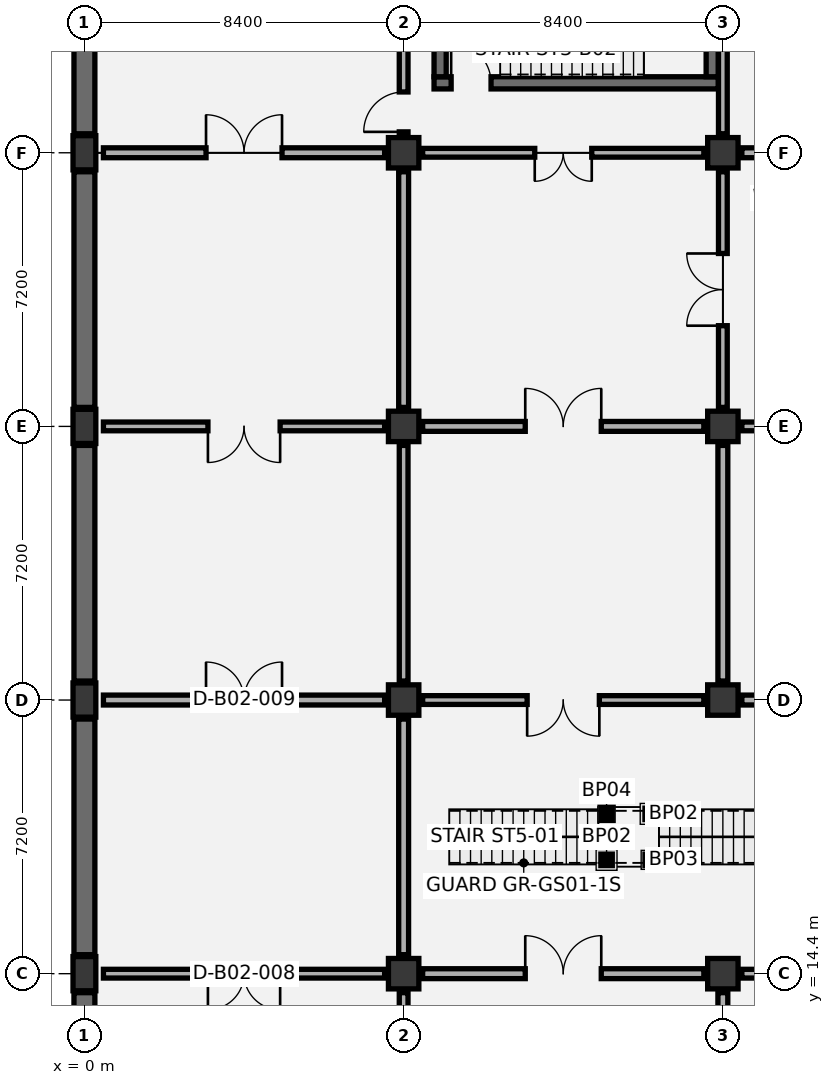
"""IFC4 building model, lengths in metres.
Left out: names, types, materials, properties, quantities, classifications, styles, units other than length and angle.
Written with IfcOpenShell. Run it as: python <this file> out.ifc"""

import sys

from ifc_helpers import new_model, si_unit, direction, frame, frame_2d, origin, origin_2d, place, context, subcontext, project, spatial, rectangle, i_section, extrude, element, fill, save


model = new_model("IFC4")
c1 = context("Model", 3, precision=1e-05, world=origin(), true_north=direction((0.0, 1.0)))
c2 = subcontext(c1, "Body", "Model", "MODEL_VIEW")
j1 = project(units=[si_unit("LENGTHUNIT", "METRE"), si_unit("PLANEANGLEUNIT", "RADIAN")], contexts=[c1])
p1 = place(None, origin())
s1 = spatial("IfcSite", under=j1, at=p1, CompositionType="ELEMENT")
p2 = place(p1, origin())
s2 = spatial("IfcBuilding", under=s1, at=p2, CompositionType="ELEMENT")
p3 = place(p2, frame((0.0, 0.0, -9.6)))
s3 = spatial("IfcBuildingStorey", under=s2, at=p3, CompositionType="ELEMENT", Elevation=-9.6)
for number, where, z_axis, x_axis in (
    (1, (0.0, 14.4, 0.0), (0.0, 0.0, 1.0), (1.0, 0.0, 0.0)),
    (2, (0.0, 21.6, 0.0), (0.0, 0.0, 1.0), (1.0, 0.0, 0.0)),
    (3, (0.0, 28.8, 0.0), (0.0, 0.0, 1.0), (1.0, 0.0, 0.0)),
    (4, (0.0, 36.0, 0.0), (0.0, 0.0, 1.0), (1.0, 0.0, 0.0)),
):
    element("IfcColumn", number, at=place(p3, frame(where, z_axis=z_axis, x_axis=x_axis)), inside=s3, PredefinedType="COLUMN", context=c2, shape_type="SweptSolid", body=[
        extrude(rectangle(XDim=0.6, YDim=0.9, at=origin_2d()), origin(), (0.0, 0.0, 1.0), 4.8),
    ])
for number, where, z_axis, x_axis in (
    (5, (8.4, 14.4, 0.0), (0.0, 0.0, 1.0), (1.0, 0.0, 0.0)),
    (6, (8.4, 21.6, 0.0), (0.0, 0.0, 1.0), (1.0, 0.0, 0.0)),
    (7, (8.4, 28.8, 0.0), (0.0, 0.0, 1.0), (1.0, 0.0, 0.0)),
    (8, (8.4, 36.0, 0.0), (0.0, 0.0, 1.0), (1.0, 0.0, 0.0)),
    (9, (16.8, 14.4, 0.0), (0.0, 0.0, 1.0), (1.0, 0.0, 0.0)),
    (10, (16.8, 21.6, 0.0), (0.0, 0.0, 1.0), (1.0, 0.0, 0.0)),
    (11, (16.8, 28.8, 0.0), (0.0, 0.0, 1.0), (1.0, 0.0, 0.0)),
    (12, (16.8, 36.0, 0.0), (0.0, 0.0, 1.0), (1.0, 0.0, 0.0)),
):
    element("IfcColumn", number, at=place(p3, frame(where, z_axis=z_axis, x_axis=x_axis)), inside=s3, PredefinedType="COLUMN", context=c2, shape_type="SweptSolid", body=[
        extrude(rectangle(XDim=0.8, YDim=0.8, at=origin_2d()), origin(), (0.0, 0.0, 1.0), 4.8),
    ])
for number, where, z_axis, x_axis in (
    (13, (13.74, 17.395, 0.0), (0.0, 0.0, 1.0), (1.0, 0.0, 0.0)),
    (14, (14.9, 17.395, 0.0), (0.0, 0.0, 1.0), (1.0, 0.0, 0.0)),
    (15, (13.74, 18.605, 0.0), (0.0, 0.0, 1.0), (1.0, 0.0, 0.0)),
    (16, (14.9, 18.605, 0.0), (0.0, 0.0, 1.0), (1.0, 0.0, 0.0)),
):
    element("IfcColumn", number, at=place(p3, frame(where, z_axis=z_axis, x_axis=x_axis)), inside=s3, PredefinedType="COLUMN", context=c2, shape_type="SweptSolid", body=[
        extrude(i_section(OverallWidth=0.3, OverallDepth=0.3, WebThickness=0.011, FlangeThickness=0.019, FilletRadius=0.027, at=origin_2d()), origin(), (0.0, 0.0, 1.0), 2.22),
    ])
p4 = place(p3, frame((0.0, 7.7, 0.0), z_axis=(0.0, 0.0, 1.0), x_axis=(0.0, 1.0, 0.0)))
e17 = element("IfcWall", 17, at=p4, inside=s3, PredefinedType="USERDEFINED", context=c2, shape_type="SweptSolid", body=[
    extrude(rectangle(XDim=6.2, YDim=0.55, at=frame_2d((3.1, 0.0))), origin(), (0.0, 0.0, 1.0), 4.4),
])
p5 = place(p3, frame((0.0, 14.9, 0.0), z_axis=(0.0, 0.0, 1.0), x_axis=(0.0, 1.0, 0.0)))
e18 = element("IfcWall", 18, at=p5, inside=s3, PredefinedType="USERDEFINED", context=c2, shape_type="SweptSolid", body=[
    extrude(rectangle(XDim=6.2, YDim=0.55, at=frame_2d((3.1, 0.0))), origin(), (0.0, 0.0, 1.0), 4.4),
])
for number, where, z_axis, x_axis in (
    (19, (0.0, 22.1, 0.0), (0.0, 0.0, 1.0), (0.0, 1.0, 0.0)),
    (20, (0.0, 29.3, 0.0), (0.0, 0.0, 1.0), (0.0, 1.0, 0.0)),
    (21, (0.0, 36.5, 0.0), (0.0, 0.0, 1.0), (0.0, 1.0, 0.0)),
):
    element("IfcWall", number, at=place(p3, frame(where, z_axis=z_axis, x_axis=x_axis)), inside=s3, PredefinedType="USERDEFINED", context=c2, shape_type="SweptSolid", body=[
        extrude(rectangle(XDim=6.2, YDim=0.55, at=frame_2d((3.1, 0.0))), origin(), (0.0, 0.0, 1.0), 4.4),
    ])
p6 = place(p3, frame((9.2, 37.84, 0.0), z_axis=(0.0, 0.0, 1.0), x_axis=(1.0, 0.0, 0.0)))
e22 = element("IfcWall", 22, at=p6, inside=s3, PredefinedType="SHEAR", context=c2, shape_type="SweptSolid", body=[
    extrude(rectangle(XDim=7.48, YDim=0.32, at=frame_2d((3.74, 0.0))), origin(), (0.0, 0.0, 1.0), 4.4),
])
p7 = place(p6, frame((0.45, 0.0, 0.0)))
e23 = element("IfcOpeningElement", 23, at=p7, cuts=e22, PredefinedType="OPENING", context=c2, shape_type="SweptSolid", body=[
    extrude(rectangle(XDim=1.05, YDim=2.15, at=frame_2d((0.525, 1.075))), frame((0.0, 0.17, 0.0), z_axis=(0.0, -1.0, 0.0), x_axis=(1.0, 0.0, 0.0)), (0.0, 0.0, 1.0), 0.34),
])
for number, where, z_axis, x_axis in (
    (24, (9.36, 38.0, 0.0), (0.0, 0.0, 1.0), (0.0, 1.0, 0.0)),
    (25, (16.52, 38.0, 0.0), (0.0, 0.0, 1.0), (0.0, 1.0, 0.0)),
):
    element("IfcWall", number, at=place(p3, frame(where, z_axis=z_axis, x_axis=x_axis)), inside=s3, PredefinedType="SHEAR", context=c2, shape_type="SweptSolid", body=[
        extrude(rectangle(XDim=3.8, YDim=0.32, at=frame_2d((1.9, 0.0))), origin(), (0.0, 0.0, 1.0), 4.4),
    ])
p8 = place(p3, frame((8.4, 7.7, 0.0), z_axis=(0.0, 0.0, 1.0), x_axis=(0.0, 1.0, 0.0)))
e26 = element("IfcWall", 26, at=p8, inside=s3, PredefinedType="PARTITIONING", context=c2, shape_type="SweptSolid", body=[
    extrude(rectangle(XDim=6.2, YDim=0.23, at=frame_2d((3.1, 0.0))), origin(), (0.0, 0.0, 1.0), 3.595),
])
p9 = place(p3, frame((0.5, 14.4, 0.0), z_axis=(0.0, 0.0, 1.0), x_axis=(1.0, 0.0, 0.0)))
e27 = element("IfcWall", 27, at=p9, inside=s3, PredefinedType="PARTITIONING", context=c2, shape_type="SweptSolid", body=[
    extrude(rectangle(XDim=7.4, YDim=0.23, at=frame_2d((3.7, 0.0))), origin(), (0.0, 0.0, 1.0), 3.495),
])
p10 = place(p9, frame((2.75, 0.0, 0.0)))
e28 = element("IfcOpeningElement", 28, at=p10, cuts=e27, PredefinedType="OPENING", context=c2, shape_type="SweptSolid", body=[
    extrude(rectangle(XDim=1.9, YDim=2.3, at=frame_2d((0.95, 1.15))), frame((0.0, 0.125, 0.0), z_axis=(0.0, -1.0, 0.0), x_axis=(1.0, 0.0, 0.0)), (0.0, 0.0, 1.0), 0.25),
])
p11 = place(p3, frame((8.4, 14.9, 0.0), z_axis=(0.0, 0.0, 1.0), x_axis=(0.0, 1.0, 0.0)))
e29 = element("IfcWall", 29, at=p11, inside=s3, PredefinedType="PARTITIONING", context=c2, shape_type="SweptSolid", body=[
    extrude(rectangle(XDim=6.2, YDim=0.26, at=frame_2d((3.1, 0.0))), origin(), (0.0, 0.0, 1.0), 3.595),
])
p12 = place(p3, frame((0.5, 21.6, 0.0), z_axis=(0.0, 0.0, 1.0), x_axis=(1.0, 0.0, 0.0)))
e30 = element("IfcWall", 30, at=p12, inside=s3, PredefinedType="PARTITIONING", context=c2, shape_type="SweptSolid", body=[
    extrude(rectangle(XDim=7.4, YDim=0.26, at=frame_2d((3.7, 0.0))), origin(), (0.0, 0.0, 1.0), 3.495),
])
p13 = place(p12, frame((2.7, 0.0, 0.0)))
e31 = element("IfcOpeningElement", 31, at=p13, cuts=e30, PredefinedType="OPENING", context=c2, shape_type="SweptSolid", body=[
    extrude(rectangle(XDim=2.0, YDim=2.35, at=frame_2d((1.0, 1.175))), frame((0.0, 0.14, 0.0), z_axis=(0.0, -1.0, 0.0), x_axis=(1.0, 0.0, 0.0)), (0.0, 0.0, 1.0), 0.28),
])
p14 = place(p3, frame((8.4, 22.1, 0.0), z_axis=(0.0, 0.0, 1.0), x_axis=(0.0, 1.0, 0.0)))
e32 = element("IfcWall", 32, at=p14, inside=s3, PredefinedType="PARTITIONING", context=c2, shape_type="SweptSolid", body=[
    extrude(rectangle(XDim=6.2, YDim=0.23, at=frame_2d((3.1, 0.0))), origin(), (0.0, 0.0, 1.0), 3.595),
])
p15 = place(p3, frame((0.5, 28.8, 0.0), z_axis=(0.0, 0.0, 1.0), x_axis=(1.0, 0.0, 0.0)))
e33 = element("IfcWall", 33, at=p15, inside=s3, PredefinedType="PARTITIONING", context=c2, shape_type="SweptSolid", body=[
    extrude(rectangle(XDim=7.4, YDim=0.23, at=frame_2d((3.7, 0.0))), origin(), (0.0, 0.0, 1.0), 3.495),
])
p16 = place(p15, frame((2.75, 0.0, 0.0)))
e34 = element("IfcOpeningElement", 34, at=p16, cuts=e33, PredefinedType="OPENING", context=c2, shape_type="SweptSolid", body=[
    extrude(rectangle(XDim=1.9, YDim=2.3, at=frame_2d((0.95, 1.15))), frame((0.0, 0.125, 0.0), z_axis=(0.0, -1.0, 0.0), x_axis=(1.0, 0.0, 0.0)), (0.0, 0.0, 1.0), 0.25),
])
p17 = place(p3, frame((8.4, 29.3, 0.0), z_axis=(0.0, 0.0, 1.0), x_axis=(0.0, 1.0, 0.0)))
e35 = element("IfcWall", 35, at=p17, inside=s3, PredefinedType="PARTITIONING", context=c2, shape_type="SweptSolid", body=[
    extrude(rectangle(XDim=6.2, YDim=0.26, at=frame_2d((3.1, 0.0))), origin(), (0.0, 0.0, 1.0), 3.595),
])
p18 = place(p3, frame((0.5, 36.0, 0.0), z_axis=(0.0, 0.0, 1.0), x_axis=(1.0, 0.0, 0.0)))
e36 = element("IfcWall", 36, at=p18, inside=s3, PredefinedType="PARTITIONING", context=c2, shape_type="SweptSolid", body=[
    extrude(rectangle(XDim=7.4, YDim=0.26, at=frame_2d((3.7, 0.0))), origin(), (0.0, 0.0, 1.0), 3.495),
])
p19 = place(p18, frame((2.7, 0.0, 0.0)))
e37 = element("IfcOpeningElement", 37, at=p19, cuts=e36, PredefinedType="OPENING", context=c2, shape_type="SweptSolid", body=[
    extrude(rectangle(XDim=2.0, YDim=2.35, at=frame_2d((1.0, 1.175))), frame((0.0, 0.14, 0.0), z_axis=(0.0, -1.0, 0.0), x_axis=(1.0, 0.0, 0.0)), (0.0, 0.0, 1.0), 0.28),
])
p20 = place(p3, frame((8.4, 36.5, 0.0), z_axis=(0.0, 0.0, 1.0), x_axis=(0.0, 1.0, 0.0)))
e38 = element("IfcWall", 38, at=p20, inside=s3, PredefinedType="PARTITIONING", context=c2, shape_type="SweptSolid", body=[
    extrude(rectangle(XDim=6.2, YDim=0.23, at=frame_2d((3.1, 0.0))), origin(), (0.0, 0.0, 1.0), 3.595),
])
p21 = place(p20, frame((0.05, 0.0, 0.0)))
e39 = element("IfcOpeningElement", 39, at=p21, cuts=e38, PredefinedType="OPENING", context=c2, shape_type="SweptSolid", body=[
    extrude(rectangle(XDim=1.05, YDim=2.15, at=frame_2d((0.525, 1.075))), frame((0.0, 0.125, 0.0), z_axis=(0.0, -1.0, 0.0), x_axis=(1.0, 0.0, 0.0)), (0.0, 0.0, 1.0), 0.25),
])
p22 = place(p3, frame((16.8, 7.7, 0.0), z_axis=(0.0, 0.0, 1.0), x_axis=(0.0, 1.0, 0.0)))
e40 = element("IfcWall", 40, at=p22, inside=s3, PredefinedType="PARTITIONING", context=c2, shape_type="SweptSolid", body=[
    extrude(rectangle(XDim=6.2, YDim=0.26, at=frame_2d((3.1, 0.0))), origin(), (0.0, 0.0, 1.0), 3.595),
])
p23 = place(p3, frame((8.9, 14.4, 0.0), z_axis=(0.0, 0.0, 1.0), x_axis=(1.0, 0.0, 0.0)))
e41 = element("IfcWall", 41, at=p23, inside=s3, PredefinedType="PARTITIONING", context=c2, shape_type="SweptSolid", body=[
    extrude(rectangle(XDim=7.4, YDim=0.26, at=frame_2d((3.7, 0.0))), origin(), (0.0, 0.0, 1.0), 3.495),
])
p24 = place(p23, frame((2.7, 0.0, 0.0)))
e42 = element("IfcOpeningElement", 42, at=p24, cuts=e41, PredefinedType="OPENING", context=c2, shape_type="SweptSolid", body=[
    extrude(rectangle(XDim=2.0, YDim=2.35, at=frame_2d((1.0, 1.175))), frame((0.0, 0.14, 0.0), z_axis=(0.0, -1.0, 0.0), x_axis=(1.0, 0.0, 0.0)), (0.0, 0.0, 1.0), 0.28),
])
p25 = place(p3, frame((8.9, 21.6, 0.0), z_axis=(0.0, 0.0, 1.0), x_axis=(1.0, 0.0, 0.0)))
e43 = element("IfcWall", 43, at=p25, inside=s3, PredefinedType="PARTITIONING", context=c2, shape_type="SweptSolid", body=[
    extrude(rectangle(XDim=7.4, YDim=0.23, at=frame_2d((3.7, 0.0))), origin(), (0.0, 0.0, 1.0), 3.495),
])
p26 = place(p25, frame((2.75, 0.0, 0.0)))
e44 = element("IfcOpeningElement", 44, at=p26, cuts=e43, PredefinedType="OPENING", context=c2, shape_type="SweptSolid", body=[
    extrude(rectangle(XDim=1.9, YDim=2.3, at=frame_2d((0.95, 1.15))), frame((0.0, 0.125, 0.0), z_axis=(0.0, -1.0, 0.0), x_axis=(1.0, 0.0, 0.0)), (0.0, 0.0, 1.0), 0.25),
])
p27 = place(p3, frame((16.8, 22.1, 0.0), z_axis=(0.0, 0.0, 1.0), x_axis=(0.0, 1.0, 0.0)))
e45 = element("IfcWall", 45, at=p27, inside=s3, PredefinedType="PARTITIONING", context=c2, shape_type="SweptSolid", body=[
    extrude(rectangle(XDim=6.2, YDim=0.26, at=frame_2d((3.1, 0.0))), origin(), (0.0, 0.0, 1.0), 3.095),
])
p28 = place(p3, frame((8.9, 28.8, 0.0), z_axis=(0.0, 0.0, 1.0), x_axis=(1.0, 0.0, 0.0)))
e46 = element("IfcWall", 46, at=p28, inside=s3, PredefinedType="PARTITIONING", context=c2, shape_type="SweptSolid", body=[
    extrude(rectangle(XDim=7.4, YDim=0.26, at=frame_2d((3.7, 0.0))), origin(), (0.0, 0.0, 1.0), 3.495),
])
p29 = place(p28, frame((2.7, 0.0, 0.0)))
e47 = element("IfcOpeningElement", 47, at=p29, cuts=e46, PredefinedType="OPENING", context=c2, shape_type="SweptSolid", body=[
    extrude(rectangle(XDim=2.0, YDim=2.35, at=frame_2d((1.0, 1.175))), frame((0.0, 0.14, 0.0), z_axis=(0.0, -1.0, 0.0), x_axis=(1.0, 0.0, 0.0)), (0.0, 0.0, 1.0), 0.28),
])
p30 = place(p3, frame((16.8, 29.3, 0.0), z_axis=(0.0, 0.0, 1.0), x_axis=(0.0, 1.0, 0.0)))
e48 = element("IfcWall", 48, at=p30, inside=s3, PredefinedType="PARTITIONING", context=c2, shape_type="SweptSolid", body=[
    extrude(rectangle(XDim=6.2, YDim=0.23, at=frame_2d((3.1, 0.0))), origin(), (0.0, 0.0, 1.0), 3.095),
])
p31 = place(p30, frame((2.15, 0.0, 0.0)))
e49 = element("IfcOpeningElement", 49, at=p31, cuts=e48, PredefinedType="OPENING", context=c2, shape_type="SweptSolid", body=[
    extrude(rectangle(XDim=1.9, YDim=2.3, at=frame_2d((0.95, 1.15))), frame((0.0, 0.125, 0.0), z_axis=(0.0, -1.0, 0.0), x_axis=(1.0, 0.0, 0.0)), (0.0, 0.0, 1.0), 0.25),
])
p32 = place(p3, frame((8.9, 36.0, 0.0), z_axis=(0.0, 0.0, 1.0), x_axis=(1.0, 0.0, 0.0)))
e50 = element("IfcWall", 50, at=p32, inside=s3, PredefinedType="PARTITIONING", context=c2, shape_type="SweptSolid", body=[
    extrude(rectangle(XDim=7.4, YDim=0.23, at=frame_2d((3.7, 0.0))), origin(), (0.0, 0.0, 1.0), 3.495),
])
p33 = place(p32, frame((2.95, 0.0, 0.0)))
e51 = element("IfcOpeningElement", 51, at=p33, cuts=e50, PredefinedType="OPENING", context=c2, shape_type="SweptSolid", body=[
    extrude(rectangle(XDim=1.5, YDim=2.15, at=frame_2d((0.75, 1.075))), frame((0.0, 0.125, 0.0), z_axis=(0.0, -1.0, 0.0), x_axis=(1.0, 0.0, 0.0)), (0.0, 0.0, 1.0), 0.25),
])
p34 = place(p3, frame((16.8, 36.5, 0.0), z_axis=(0.0, 0.0, 1.0), x_axis=(0.0, 1.0, 0.0)))
e52 = element("IfcWall", 52, at=p34, inside=s3, PredefinedType="PARTITIONING", context=c2, shape_type="SweptSolid", body=[
    extrude(rectangle(XDim=6.2, YDim=0.23, at=frame_2d((3.1, 0.0))), origin(), (0.0, 0.0, 1.0), 3.595),
])
p35 = place(p3, frame((17.3, 14.4, 0.0), z_axis=(0.0, 0.0, 1.0), x_axis=(1.0, 0.0, 0.0)))
e53 = element("IfcWall", 53, at=p35, inside=s3, PredefinedType="PARTITIONING", context=c2, shape_type="SweptSolid", body=[
    extrude(rectangle(XDim=7.4, YDim=0.23, at=frame_2d((3.7, 0.0))), origin(), (0.0, 0.0, 1.0), 3.495),
])
p36 = place(p35, frame((2.7, 0.0, 0.0)))
e54 = element("IfcOpeningElement", 54, at=p36, cuts=e53, PredefinedType="OPENING", context=c2, shape_type="SweptSolid", body=[
    extrude(rectangle(XDim=2.0, YDim=2.35, at=frame_2d((1.0, 1.175))), frame((0.0, 0.125, 0.0), z_axis=(0.0, -1.0, 0.0), x_axis=(1.0, 0.0, 0.0)), (0.0, 0.0, 1.0), 0.25),
])
p37 = place(p3, frame((17.3, 21.6, 0.0), z_axis=(0.0, 0.0, 1.0), x_axis=(1.0, 0.0, 0.0)))
e55 = element("IfcWall", 55, at=p37, inside=s3, PredefinedType="PARTITIONING", context=c2, shape_type="SweptSolid", body=[
    extrude(rectangle(XDim=7.4, YDim=0.26, at=frame_2d((3.7, 0.0))), origin(), (0.0, 0.0, 1.0), 2.995),
])
p38 = place(p37, frame((2.7, 0.0, 0.0)))
e56 = element("IfcOpeningElement", 56, at=p38, cuts=e55, PredefinedType="OPENING", context=c2, shape_type="SweptSolid", body=[
    extrude(rectangle(XDim=2.0, YDim=2.35, at=frame_2d((1.0, 1.175))), frame((0.0, 0.14, 0.0), z_axis=(0.0, -1.0, 0.0), x_axis=(1.0, 0.0, 0.0)), (0.0, 0.0, 1.0), 0.28),
])
p39 = place(p3, frame((17.3, 28.8, 0.0), z_axis=(0.0, 0.0, 1.0), x_axis=(1.0, 0.0, 0.0)))
e57 = element("IfcWall", 57, at=p39, inside=s3, PredefinedType="PARTITIONING", context=c2, shape_type="SweptSolid", body=[
    extrude(rectangle(XDim=7.4, YDim=0.23, at=frame_2d((3.7, 0.0))), origin(), (0.0, 0.0, 1.0), 3.9),
])
p40 = place(p39, frame((2.75, 0.0, 0.0)))
e58 = element("IfcOpeningElement", 58, at=p40, cuts=e57, PredefinedType="OPENING", context=c2, shape_type="SweptSolid", body=[
    extrude(rectangle(XDim=1.9, YDim=2.3, at=frame_2d((0.95, 1.15))), frame((0.0, 0.125, 0.0), z_axis=(0.0, -1.0, 0.0), x_axis=(1.0, 0.0, 0.0)), (0.0, 0.0, 1.0), 0.25),
])
p41 = place(p3, frame((17.3, 36.0, 0.0), z_axis=(0.0, 0.0, 1.0), x_axis=(1.0, 0.0, 0.0)))
e59 = element("IfcWall", 59, at=p41, inside=s3, PredefinedType="PARTITIONING", context=c2, shape_type="SweptSolid", body=[
    extrude(rectangle(XDim=7.4, YDim=0.26, at=frame_2d((3.7, 0.0))), origin(), (0.0, 0.0, 1.0), 2.995),
])
p42 = place(p41, frame((2.7, 0.0, 0.0)))
e60 = element("IfcOpeningElement", 60, at=p42, cuts=e59, PredefinedType="OPENING", context=c2, shape_type="SweptSolid", body=[
    extrude(rectangle(XDim=2.0, YDim=2.35, at=frame_2d((1.0, 1.175))), frame((0.0, 0.14, 0.0), z_axis=(0.0, -1.0, 0.0), x_axis=(1.0, 0.0, 0.0)), (0.0, 0.0, 1.0), 0.28),
])
p43 = place(p7, origin())
e61 = element("IfcDoor", 61, at=p43, inside=s3, OperationType="SINGLE_SWING_LEFT", PredefinedType="DOOR", context=c2, shape_type="SweptSolid", body=[
    extrude(rectangle(XDim=1.05, YDim=2.15, at=frame_2d((0.525, 1.075))), frame((0.0, 0.025, 0.0), z_axis=(0.0, -1.0, 0.0), x_axis=(1.0, 0.0, 0.0)), (0.0, 0.0, 1.0), 0.05),
])
fill(e23, e61)
p44 = place(p10, frame((1.9, 0.0, 0.0), z_axis=(0.0, 0.0, 1.0), x_axis=(-1.0, 0.0, 0.0)))
e62 = element("IfcDoor", 62, at=p44, inside=s3, OperationType="DOUBLE_DOOR_SINGLE_SWING", PredefinedType="DOOR", context=c2, shape_type="SweptSolid", body=[
    extrude(rectangle(XDim=1.9, YDim=2.3, at=frame_2d((0.95, 1.15))), frame((0.0, 0.025, 0.0), z_axis=(0.0, -1.0, 0.0), x_axis=(1.0, 0.0, 0.0)), (0.0, 0.0, 1.0), 0.05),
])
fill(e28, e62)
p45 = place(p13, origin())
e63 = element("IfcDoor", 63, at=p45, inside=s3, OperationType="DOUBLE_DOOR_SINGLE_SWING", PredefinedType="DOOR", context=c2, shape_type="SweptSolid", body=[
    extrude(rectangle(XDim=2.0, YDim=2.35, at=frame_2d((1.0, 1.175))), frame((0.0, 0.025, 0.0), z_axis=(0.0, -1.0, 0.0), x_axis=(1.0, 0.0, 0.0)), (0.0, 0.0, 1.0), 0.05),
])
fill(e31, e63)
p46 = place(p16, frame((1.9, 0.0, 0.0), z_axis=(0.0, 0.0, 1.0), x_axis=(-1.0, 0.0, 0.0)))
e64 = element("IfcDoor", 64, at=p46, inside=s3, OperationType="DOUBLE_DOOR_SINGLE_SWING", PredefinedType="DOOR", context=c2, shape_type="SweptSolid", body=[
    extrude(rectangle(XDim=1.9, YDim=2.3, at=frame_2d((0.95, 1.15))), frame((0.0, 0.025, 0.0), z_axis=(0.0, -1.0, 0.0), x_axis=(1.0, 0.0, 0.0)), (0.0, 0.0, 1.0), 0.05),
])
fill(e34, e64)
p47 = place(p19, origin())
e65 = element("IfcDoor", 65, at=p47, inside=s3, OperationType="DOUBLE_DOOR_SINGLE_SWING", PredefinedType="DOOR", context=c2, shape_type="SweptSolid", body=[
    extrude(rectangle(XDim=2.0, YDim=2.35, at=frame_2d((1.0, 1.175))), frame((0.0, 0.025, 0.0), z_axis=(0.0, -1.0, 0.0), x_axis=(1.0, 0.0, 0.0)), (0.0, 0.0, 1.0), 0.05),
])
fill(e37, e65)
p48 = place(p21, origin())
e66 = element("IfcDoor", 66, at=p48, inside=s3, OperationType="SINGLE_SWING_LEFT", PredefinedType="DOOR", context=c2, shape_type="SweptSolid", body=[
    extrude(rectangle(XDim=1.05, YDim=2.15, at=frame_2d((0.525, 1.075))), frame((0.0, 0.025, 0.0), z_axis=(0.0, -1.0, 0.0), x_axis=(1.0, 0.0, 0.0)), (0.0, 0.0, 1.0), 0.05),
])
fill(e39, e66)
p49 = place(p24, origin())
e67 = element("IfcDoor", 67, at=p49, inside=s3, OperationType="DOUBLE_DOOR_SINGLE_SWING", PredefinedType="DOOR", context=c2, shape_type="SweptSolid", body=[
    extrude(rectangle(XDim=2.0, YDim=2.35, at=frame_2d((1.0, 1.175))), frame((0.0, 0.025, 0.0), z_axis=(0.0, -1.0, 0.0), x_axis=(1.0, 0.0, 0.0)), (0.0, 0.0, 1.0), 0.05),
])
fill(e42, e67)
p50 = place(p26, frame((1.9, 0.0, 0.0), z_axis=(0.0, 0.0, 1.0), x_axis=(-1.0, 0.0, 0.0)))
e68 = element("IfcDoor", 68, at=p50, inside=s3, OperationType="DOUBLE_DOOR_SINGLE_SWING", PredefinedType="DOOR", context=c2, shape_type="SweptSolid", body=[
    extrude(rectangle(XDim=1.9, YDim=2.3, at=frame_2d((0.95, 1.15))), frame((0.0, 0.025, 0.0), z_axis=(0.0, -1.0, 0.0), x_axis=(1.0, 0.0, 0.0)), (0.0, 0.0, 1.0), 0.05),
])
fill(e44, e68)
p51 = place(p29, origin())
e69 = element("IfcDoor", 69, at=p51, inside=s3, OperationType="DOUBLE_DOOR_SINGLE_SWING", PredefinedType="DOOR", context=c2, shape_type="SweptSolid", body=[
    extrude(rectangle(XDim=2.0, YDim=2.35, at=frame_2d((1.0, 1.175))), frame((0.0, 0.025, 0.0), z_axis=(0.0, -1.0, 0.0), x_axis=(1.0, 0.0, 0.0)), (0.0, 0.0, 1.0), 0.05),
])
fill(e47, e69)
p52 = place(p31, origin())
e70 = element("IfcDoor", 70, at=p52, inside=s3, OperationType="DOUBLE_DOOR_SINGLE_SWING", PredefinedType="DOOR", context=c2, shape_type="SweptSolid", body=[
    extrude(rectangle(XDim=1.9, YDim=2.3, at=frame_2d((0.95, 1.15))), frame((0.0, 0.025, 0.0), z_axis=(0.0, -1.0, 0.0), x_axis=(1.0, 0.0, 0.0)), (0.0, 0.0, 1.0), 0.05),
])
fill(e49, e70)
p53 = place(p33, frame((1.5, 0.0, 0.0), z_axis=(0.0, 0.0, 1.0), x_axis=(-1.0, 0.0, 0.0)))
e71 = element("IfcDoor", 71, at=p53, inside=s3, OperationType="DOUBLE_DOOR_SINGLE_SWING", PredefinedType="DOOR", context=c2, shape_type="SweptSolid", body=[
    extrude(rectangle(XDim=1.5, YDim=2.15, at=frame_2d((0.75, 1.075))), frame((0.0, 0.025, 0.0), z_axis=(0.0, -1.0, 0.0), x_axis=(1.0, 0.0, 0.0)), (0.0, 0.0, 1.0), 0.05),
])
fill(e51, e71)
save(model, sys.argv[1])
